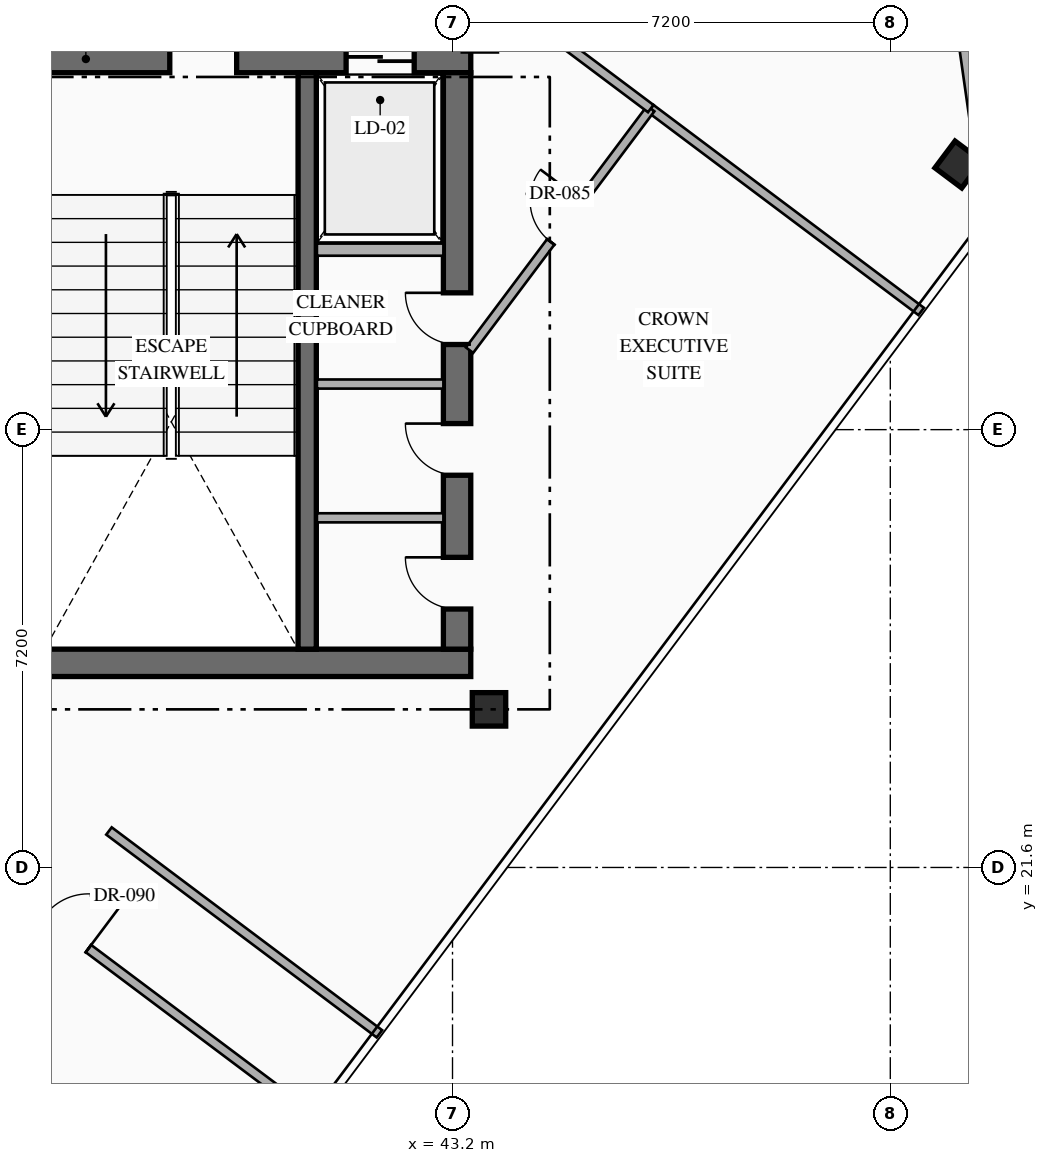
"""IFC4 building model, lengths in metres.
Left out: names, types, materials, properties, quantities, classifications, styles, units other than length and angle.
Written with IfcOpenShell. Run it as: python <this file> out.ifc"""

import sys

from ifc_helpers import new_model, si_unit, direction, frame, frame_2d, origin, origin_2d, place, context, subcontext, project, spatial, rectangle, hollow_rectangle, extrude, element, fill, save


model = new_model("IFC4")
c1 = context("Model", 3, precision=1e-05, world=origin(), true_north=direction((0.0, 1.0)))
c2 = subcontext(c1, "Body", "Model", "MODEL_VIEW")
j1 = project(units=[si_unit("LENGTHUNIT", "METRE"), si_unit("PLANEANGLEUNIT", "RADIAN")], contexts=[c1])
p1 = place(None, origin())
s1 = spatial("IfcSite", under=j1, at=p1, CompositionType="ELEMENT")
p2 = place(p1, origin())
s2 = spatial("IfcBuilding", under=s1, at=p2, CompositionType="ELEMENT")
p3 = place(p2, frame((0.0, 0.0, 285.95)))
s3 = spatial("IfcBuildingStorey", under=s2, at=p3, CompositionType="ELEMENT", Elevation=285.95)
p4 = place(p3, frame((36.04, 24.965, 0.0), z_axis=(0.0, 0.0, 1.0), x_axis=(1.0, 0.0, 0.0)))
e1 = element("IfcWall", 1, at=p4, inside=s3, PredefinedType="SHEAR", context=c2, shape_type="SweptSolid", body=[
    extrude(rectangle(XDim=7.46, YDim=0.45, at=frame_2d((3.73, 0.0))), origin(), (0.0, 0.0, 1.0), 4.0),
])
p5 = place(p3, frame((36.04, 34.895, 0.0), z_axis=(0.0, 0.0, 1.0), x_axis=(1.0, 0.0, 0.0)))
e2 = element("IfcWall", 2, at=p5, inside=s3, PredefinedType="SHEAR", context=c2, shape_type="SweptSolid", body=[
    extrude(rectangle(XDim=7.46, YDim=0.45, at=frame_2d((3.73, 0.0))), origin(), (0.0, 0.0, 1.0), 4.0),
])
p6 = place(p5, frame((2.51, 0.0, 0.0)))
e3 = element("IfcOpeningElement", 3, at=p6, cuts=e2, PredefinedType="OPENING", context=c2, shape_type="SweptSolid", body=[
    extrude(rectangle(XDim=1.1, YDim=2.2, at=frame_2d((0.55, 1.1))), frame((0.0, 0.235, 0.0), z_axis=(0.0, -1.0, 0.0), x_axis=(1.0, 0.0, 0.0)), (0.0, 0.0, 1.0), 0.47),
])
p7 = place(p5, frame((5.41, 0.0, 0.0)))
e4 = element("IfcOpeningElement", 4, at=p7, cuts=e2, PredefinedType="OPENING", context=c2, shape_type="SweptSolid", body=[
    extrude(rectangle(XDim=1.12, YDim=2.15, at=frame_2d((0.56, 1.075))), frame((0.0, 0.235, 0.0), z_axis=(0.0, -1.0, 0.0), x_axis=(1.0, 0.0, 0.0)), (0.0, 0.0, 1.0), 0.47),
])
p8 = place(p3, frame((43.275, 25.19, 0.0), z_axis=(0.0, 0.0, 1.0), x_axis=(0.0, 1.0, 0.0)))
e5 = element("IfcWall", 5, at=p8, inside=s3, PredefinedType="SHEAR", context=c2, shape_type="SweptSolid", body=[
    extrude(rectangle(XDim=9.48, YDim=0.45, at=frame_2d((4.74, 0.0))), origin(), (0.0, 0.0, 1.0), 4.0),
])
p9 = place(p8, frame((0.66, 0.0, 0.0)))
e6 = element("IfcOpeningElement", 6, at=p9, cuts=e5, PredefinedType="OPENING", context=c2, shape_type="SweptSolid", body=[
    extrude(rectangle(XDim=0.85, YDim=2.08, at=frame_2d((0.425, 1.04))), frame((0.0, 0.235, 0.0), z_axis=(0.0, -1.0, 0.0), x_axis=(1.0, 0.0, 0.0)), (0.0, 0.0, 1.0), 0.47),
])
p10 = place(p8, frame((2.86, 0.0, 0.0)))
e7 = element("IfcOpeningElement", 7, at=p10, cuts=e5, PredefinedType="OPENING", context=c2, shape_type="SweptSolid", body=[
    extrude(rectangle(XDim=0.85, YDim=2.08, at=frame_2d((0.425, 1.04))), frame((0.0, 0.235, 0.0), z_axis=(0.0, -1.0, 0.0), x_axis=(1.0, 0.0, 0.0)), (0.0, 0.0, 1.0), 0.47),
])
p11 = place(p8, frame((5.01, 0.0, 0.0)))
e8 = element("IfcOpeningElement", 8, at=p11, cuts=e5, PredefinedType="OPENING", context=c2, shape_type="SweptSolid", body=[
    extrude(rectangle(XDim=0.85, YDim=2.08, at=frame_2d((0.425, 1.04))), frame((0.0, 0.235, 0.0), z_axis=(0.0, -1.0, 0.0), x_axis=(1.0, 0.0, 0.0)), (0.0, 0.0, 1.0), 0.47),
])
p12 = place(p3, frame((40.81, 25.19, 0.0), z_axis=(0.0, 0.0, 1.0), x_axis=(0.0, 1.0, 0.0)))
e9 = element("IfcWall", 9, at=p12, inside=s3, PredefinedType="SHEAR", context=c2, shape_type="SweptSolid", body=[
    extrude(rectangle(XDim=9.48, YDim=0.3, at=frame_2d((4.74, 0.0))), origin(), (0.0, 0.0, 1.0), 4.0),
])
for number, where, z_axis, x_axis in (
    (10, (43.8, 24.2, 0.0), (0.0, 0.0, 1.0), (1.0, 0.0, 0.0)),
    (11, (51.52, 33.16, 0.0), (0.0, 0.0, 1.0), (0.8, -0.6, 0.0)),
):
    element("IfcColumn", number, at=place(p3, frame(where, z_axis=z_axis, x_axis=x_axis)), inside=s3, PredefinedType="COLUMN", context=c2, shape_type="SweptSolid", body=[
        extrude(hollow_rectangle(XDim=0.55, YDim=0.55, WallThickness=0.022, at=origin_2d()), origin(), (0.0, 0.0, 1.0), 4.0),
    ])
p13 = place(p3, frame((51.59, 35.683, 0.0), z_axis=(0.0, 0.0, 1.0), x_axis=(0.141212810973, -0.989979263428, 0.0)))
e12 = element("IfcWall", 12, at=p13, inside=s3, PredefinedType="STANDARD", context=c2, shape_type="SweptSolid", body=[
    extrude(rectangle(XDim=3.278, YDim=0.28, at=frame_2d((1.639, 0.0))), origin(), (0.0, 0.0, 1.0), 3.7),
])
p14 = place(p3, frame((40.97, 31.76, 0.0), z_axis=(0.0, 0.0, 1.0), x_axis=(1.0, 0.0, 0.0)))
e13 = element("IfcWall", 13, at=p14, inside=s3, PredefinedType="STANDARD", context=c2, shape_type="SweptSolid", body=[
    extrude(rectangle(XDim=2.08, YDim=0.2, at=frame_2d((1.04, 0.0))), origin(), (0.0, 0.0, 1.0), 3.7),
])
for number, where, z_axis, x_axis in (
    (14, (40.97, 27.35, 0.0), (0.0, 0.0, 1.0), (1.0, 0.0, 0.0)),
    (15, (40.97, 29.55, 0.0), (0.0, 0.0, 1.0), (1.0, 0.0, 0.0)),
):
    element("IfcWall", number, at=place(p3, frame(where, z_axis=z_axis, x_axis=x_axis)), inside=s3, PredefinedType="PARTITIONING", context=c2, shape_type="SweptSolid", body=[
        extrude(rectangle(XDim=2.08, YDim=0.15, at=frame_2d((1.04, 0.0))), origin(), (0.0, 0.0, 1.0), 3.7),
    ])
p15 = place(p3, frame((28.18, 27.04, 0.0), z_axis=(0.0, 0.0, 1.0), x_axis=(0.80000367127, -0.599995104942, 0.0)))
e16 = element("IfcWall", 16, at=p15, inside=s3, PredefinedType="PARTITIONING", context=c2, shape_type="SweptSolid", body=[
    extrude(rectangle(XDim=15.96, YDim=0.15, at=frame_2d((7.98, 0.0))), origin(), (0.0, 0.0, 1.0), 3.7),
])
p16 = place(p15, frame((10.39, 0.0, 0.0)))
e17 = element("IfcOpeningElement", 17, at=p16, cuts=e16, PredefinedType="OPENING", context=c2, shape_type="SweptSolid", body=[
    extrude(rectangle(XDim=0.9, YDim=2.15, at=frame_2d((0.45, 1.075))), frame((0.0, 0.085, 0.0), z_axis=(0.0, -1.0, 0.0), x_axis=(1.0, 0.0, 0.0)), (0.0, 0.0, 1.0), 0.17),
])
for number, where, z_axis, x_axis in (
    (18, (37.55, 22.2, 0.0), (0.0, 0.0, 1.0), (0.8, -0.6, 0.0)),
    (19, (46.46, 34.08, 0.0), (0.0, 0.0, 1.0), (0.8, -0.6, 0.0)),
):
    element("IfcWall", number, at=place(p3, frame(where, z_axis=z_axis, x_axis=x_axis)), inside=s3, PredefinedType="PARTITIONING", context=c2, shape_type="SweptSolid", body=[
        extrude(rectangle(XDim=5.56, YDim=0.15, at=frame_2d((2.78, 0.0))), origin(), (0.0, 0.0, 1.0), 3.7),
    ])
p17 = place(p3, frame((43.48, 30.107, 0.0), z_axis=(0.0, 0.0, 1.0), x_axis=(0.600015730265, 0.799988202059, 0.0)))
e20 = element("IfcWall", 20, at=p17, inside=s3, PredefinedType="PARTITIONING", context=c2, shape_type="SweptSolid", body=[
    extrude(rectangle(XDim=4.967, YDim=0.15, at=frame_2d((2.483, 0.0))), origin(), (0.0, 0.0, 1.0), 3.7),
])
p18 = place(p17, frame((2.226, 0.0, 0.0)))
e21 = element("IfcOpeningElement", 21, at=p18, cuts=e20, PredefinedType="OPENING", context=c2, shape_type="SweptSolid", body=[
    extrude(rectangle(XDim=0.85, YDim=2.08, at=frame_2d((0.425, 1.04))), frame((0.0, 0.085, 0.0), z_axis=(0.0, -1.0, 0.0), x_axis=(1.0, 0.0, 0.0)), (0.0, 0.0, 1.0), 0.17),
])
p19 = place(p3, frame((42.94, 36.72, 0.0), z_axis=(0.0, 0.0, 1.0), x_axis=(0.800013316712, -0.599982243973, 0.0)))
e22 = element("IfcWall", 22, at=p19, inside=s3, PredefinedType="PARTITIONING", context=c2, shape_type="SweptSolid", body=[
    extrude(rectangle(XDim=4.4, YDim=0.15, at=frame_2d((2.2, 0.0))), origin(), (0.0, 0.0, 1.0), 3.245),
])
p20 = place(p6, origin())
e23 = element("IfcDoor", 23, at=p20, inside=s3, OperationType="SINGLE_SWING_RIGHT", PredefinedType="DOOR", context=c2, shape_type="SweptSolid", body=[
    extrude(rectangle(XDim=1.1, YDim=2.2, at=frame_2d((0.55, 1.1))), frame((0.0, 0.025, 0.0), z_axis=(0.0, -1.0, 0.0), x_axis=(1.0, 0.0, 0.0)), (0.0, 0.0, 1.0), 0.05),
])
fill(e3, e23)
p21 = place(p7, origin())
e24 = element("IfcDoor", 24, at=p21, inside=s3, OperationType="SLIDING_TO_RIGHT", PredefinedType="USERDEFINED", context=c2, shape_type="SweptSolid", body=[
    extrude(rectangle(XDim=1.12, YDim=2.15, at=frame_2d((0.56, 1.075))), frame((0.0, 0.025, 0.0), z_axis=(0.0, -1.0, 0.0), x_axis=(1.0, 0.0, 0.0)), (0.0, 0.0, 1.0), 0.05),
])
fill(e4, e24)
p22 = place(p9, origin())
e25 = element("IfcDoor", 25, at=p22, inside=s3, OperationType="SINGLE_SWING_RIGHT", PredefinedType="DOOR", context=c2, shape_type="SweptSolid", body=[
    extrude(rectangle(XDim=0.85, YDim=2.08, at=frame_2d((0.425, 1.04))), frame((0.0, 0.025, 0.0), z_axis=(0.0, -1.0, 0.0), x_axis=(1.0, 0.0, 0.0)), (0.0, 0.0, 1.0), 0.05),
])
fill(e6, e25)
p23 = place(p10, origin())
e26 = element("IfcDoor", 26, at=p23, inside=s3, OperationType="SINGLE_SWING_RIGHT", PredefinedType="DOOR", context=c2, shape_type="SweptSolid", body=[
    extrude(rectangle(XDim=0.85, YDim=2.08, at=frame_2d((0.425, 1.04))), frame((0.0, 0.025, 0.0), z_axis=(0.0, -1.0, 0.0), x_axis=(1.0, 0.0, 0.0)), (0.0, 0.0, 1.0), 0.05),
])
fill(e7, e26)
p24 = place(p11, origin())
e27 = element("IfcDoor", 27, at=p24, inside=s3, OperationType="SINGLE_SWING_RIGHT", PredefinedType="DOOR", context=c2, shape_type="SweptSolid", body=[
    extrude(rectangle(XDim=0.85, YDim=2.08, at=frame_2d((0.425, 1.04))), frame((0.0, 0.025, 0.0), z_axis=(0.0, -1.0, 0.0), x_axis=(1.0, 0.0, 0.0)), (0.0, 0.0, 1.0), 0.05),
])
fill(e8, e27)
p25 = place(p16, origin())
e28 = element("IfcDoor", 28, at=p25, inside=s3, OperationType="SINGLE_SWING_RIGHT", PredefinedType="DOOR", context=c2, shape_type="SweptSolid", body=[
    extrude(rectangle(XDim=0.9, YDim=2.15, at=frame_2d((0.45, 1.075))), frame((0.0, 0.025, 0.0), z_axis=(0.0, -1.0, 0.0), x_axis=(1.0, 0.0, 0.0)), (0.0, 0.0, 1.0), 0.05),
])
fill(e17, e28)
p26 = place(p18, origin())
e29 = element("IfcDoor", 29, at=p26, inside=s3, OperationType="SINGLE_SWING_RIGHT", PredefinedType="DOOR", context=c2, shape_type="SweptSolid", body=[
    extrude(rectangle(XDim=0.85, YDim=2.08, at=frame_2d((0.425, 1.04))), frame((0.0, 0.025, 0.0), z_axis=(0.0, -1.0, 0.0), x_axis=(1.0, 0.0, 0.0)), (0.0, 0.0, 1.0), 0.05),
])
fill(e21, e29)
save(model, sys.argv[1])
